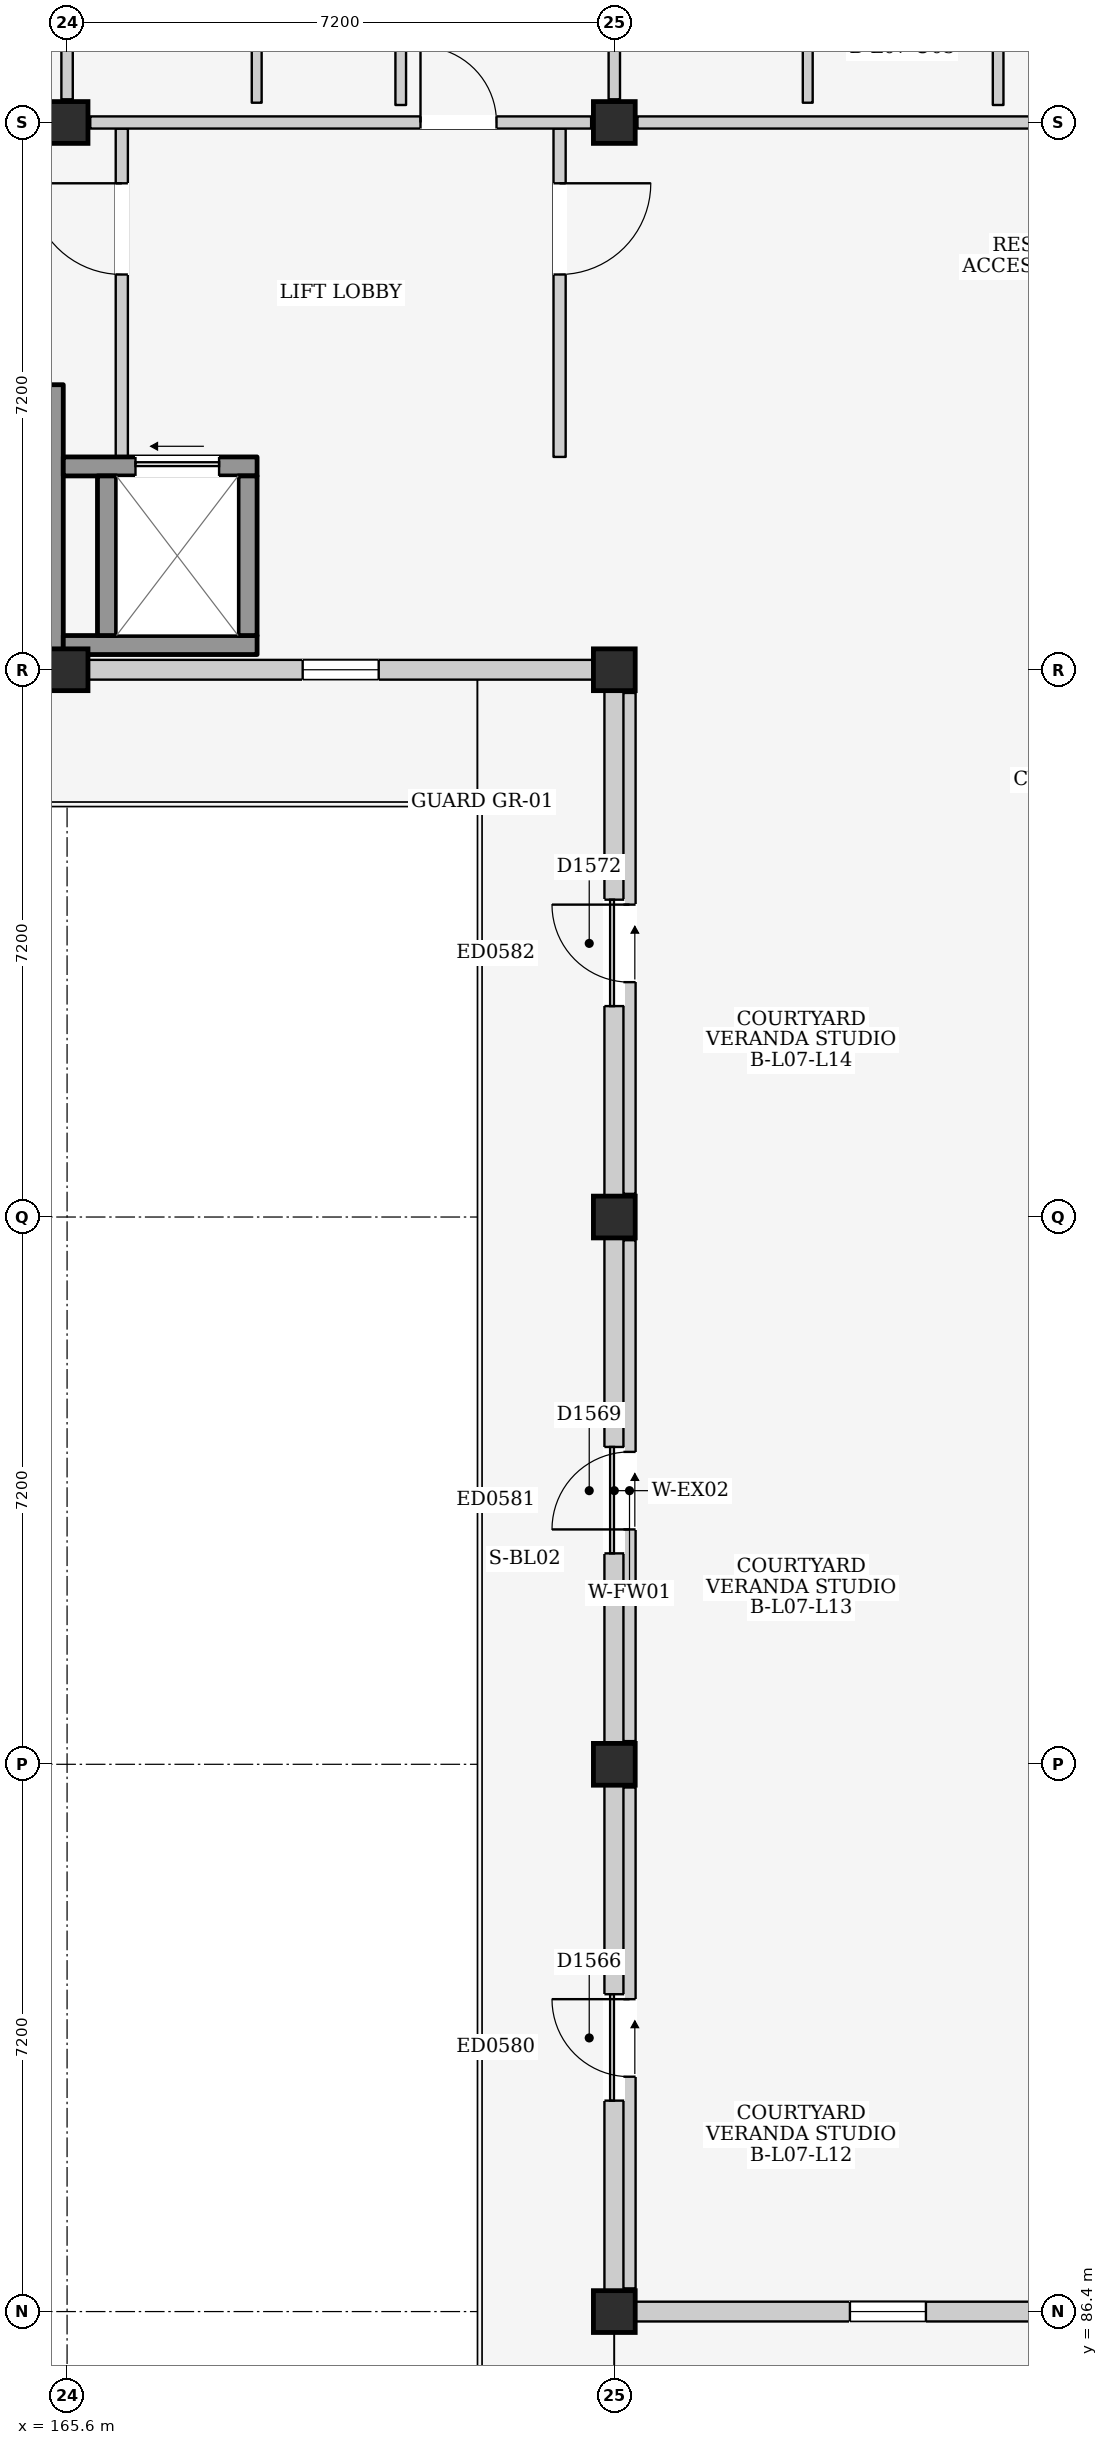
"""IFC4 building model, lengths in metres.
Left out: names, types, materials, properties, quantities, classifications, styles, units other than length and angle.
Written with IfcOpenShell. Run it as: python <this file> out.ifc"""

import sys

from ifc_helpers import new_model, si_unit, direction, frame, frame_2d, origin, origin_2d, place, context, subcontext, project, spatial, rectangle, extrude, element, fill, save


model = new_model("IFC4")
c1 = context("Model", 3, precision=1e-05, world=origin(), true_north=direction((0.0, 1.0)))
c2 = subcontext(c1, "Body", "Model", "MODEL_VIEW")
j1 = project(units=[si_unit("LENGTHUNIT", "METRE"), si_unit("PLANEANGLEUNIT", "RADIAN")], contexts=[c1])
p1 = place(None, origin())
s1 = spatial("IfcSite", under=j1, at=p1, CompositionType="ELEMENT")
p2 = place(p1, origin())
s2 = spatial("IfcBuilding", under=s1, at=p2, CompositionType="ELEMENT")
p3 = place(p2, frame((0.0, 0.0, 25.1)))
s3 = spatial("IfcBuildingStorey", under=s2, at=p3, CompositionType="ELEMENT", Elevation=25.1)
for number, where, z_axis, x_axis in (
    (1, (165.6, 108.0, 0.0), (0.0, 0.0, 1.0), (1.0, 0.0, 0.0)),
    (2, (165.6, 115.2, 0.0), (0.0, 0.0, 1.0), (1.0, 0.0, 0.0)),
    (3, (172.8, 86.4, 0.0), (0.0, 0.0, 1.0), (1.0, 0.0, 0.0)),
    (4, (172.8, 93.6, 0.0), (0.0, 0.0, 1.0), (1.0, 0.0, 0.0)),
    (5, (172.8, 100.8, 0.0), (0.0, 0.0, 1.0), (1.0, 0.0, 0.0)),
    (6, (172.8, 108.0, 0.0), (0.0, 0.0, 1.0), (1.0, 0.0, 0.0)),
    (7, (172.8, 115.2, 0.0), (0.0, 0.0, 1.0), (1.0, 0.0, 0.0)),
):
    element("IfcColumn", number, at=place(p3, frame(where, z_axis=z_axis, x_axis=x_axis)), inside=s3, PredefinedType="COLUMN", context=c2, shape_type="SweptSolid", body=[
        extrude(rectangle(XDim=0.55, YDim=0.55, at=origin_2d()), origin(), (0.0, 0.0, 1.0), 3.2),
    ])
p4 = place(p3, frame((165.875, 108.0, 0.0), z_axis=(0.0, 0.0, 1.0), x_axis=(1.0, 0.0, 0.0)))
e8 = element("IfcWall", 8, at=p4, inside=s3, PredefinedType="ELEMENTEDWALL", context=c2, shape_type="SweptSolid", body=[
    extrude(rectangle(XDim=6.65, YDim=0.26, at=frame_2d((3.325, 0.0))), origin(), (0.0, 0.0, 1.0), 2.375),
])
p5 = place(p4, frame((2.825, 0.0, 1.2)))
e9 = element("IfcOpeningElement", 9, at=p5, cuts=e8, PredefinedType="OPENING", context=c2, shape_type="SweptSolid", body=[
    extrude(rectangle(XDim=1.0, YDim=0.9, at=frame_2d((0.5, 0.45))), frame((0.0, 0.145, 0.0), z_axis=(0.0, -1.0, 0.0), x_axis=(1.0, 0.0, 0.0)), (0.0, 0.0, 1.0), 0.29),
])
p6 = place(p3, frame((173.075, 86.4, 0.0), z_axis=(0.0, 0.0, 1.0), x_axis=(1.0, 0.0, 0.0)))
e10 = element("IfcWall", 10, at=p6, inside=s3, PredefinedType="ELEMENTEDWALL", context=c2, shape_type="SweptSolid", body=[
    extrude(rectangle(XDim=6.65, YDim=0.26, at=frame_2d((3.325, 0.0))), origin(), (0.0, 0.0, 1.0), 2.375),
])
p7 = place(p6, frame((2.825, 0.0, 1.1)))
e11 = element("IfcOpeningElement", 11, at=p7, cuts=e10, PredefinedType="OPENING", context=c2, shape_type="SweptSolid", body=[
    extrude(rectangle(XDim=1.0, YDim=0.9, at=frame_2d((0.5, 0.45))), frame((0.0, 0.145, 0.0), z_axis=(0.0, -1.0, 0.0), x_axis=(1.0, 0.0, 0.0)), (0.0, 0.0, 1.0), 0.29),
])
p8 = place(p3, frame((172.8, 86.675, 0.0), z_axis=(0.0, 0.0, 1.0), x_axis=(0.0, 1.0, 0.0)))
e12 = element("IfcWall", 12, at=p8, inside=s3, PredefinedType="ELEMENTEDWALL", context=c2, shape_type="SweptSolid", body=[
    extrude(rectangle(XDim=6.65, YDim=0.26, at=frame_2d((3.325, 0.0))), origin(), (0.0, 0.0, 1.0), 2.475),
])
p9 = place(p8, frame((2.5, 0.0, 0.0)))
e13 = element("IfcOpeningElement", 13, at=p9, cuts=e12, PredefinedType="OPENING", context=c2, shape_type="SweptSolid", body=[
    extrude(rectangle(XDim=1.4, YDim=2.1, at=frame_2d((0.7, 1.05))), frame((0.0, 0.145, 0.0), z_axis=(0.0, -1.0, 0.0), x_axis=(1.0, 0.0, 0.0)), (0.0, 0.0, 1.0), 0.29),
])
p10 = place(p3, frame((172.8, 93.875, 0.0), z_axis=(0.0, 0.0, 1.0), x_axis=(0.0, 1.0, 0.0)))
e14 = element("IfcWall", 14, at=p10, inside=s3, PredefinedType="ELEMENTEDWALL", context=c2, shape_type="SweptSolid", body=[
    extrude(rectangle(XDim=6.65, YDim=0.26, at=frame_2d((3.325, 0.0))), origin(), (0.0, 0.0, 1.0), 2.475),
])
p11 = place(p10, frame((2.5, 0.0, 0.0)))
e15 = element("IfcOpeningElement", 15, at=p11, cuts=e14, PredefinedType="OPENING", context=c2, shape_type="SweptSolid", body=[
    extrude(rectangle(XDim=1.4, YDim=2.1, at=frame_2d((0.7, 1.05))), frame((0.0, 0.145, 0.0), z_axis=(0.0, -1.0, 0.0), x_axis=(1.0, 0.0, 0.0)), (0.0, 0.0, 1.0), 0.29),
])
p12 = place(p3, frame((172.8, 101.075, 0.0), z_axis=(0.0, 0.0, 1.0), x_axis=(0.0, 1.0, 0.0)))
e16 = element("IfcWall", 16, at=p12, inside=s3, PredefinedType="ELEMENTEDWALL", context=c2, shape_type="SweptSolid", body=[
    extrude(rectangle(XDim=6.65, YDim=0.26, at=frame_2d((3.325, 0.0))), origin(), (0.0, 0.0, 1.0), 2.475),
])
p13 = place(p12, frame((2.5, 0.0, 0.0)))
e17 = element("IfcOpeningElement", 17, at=p13, cuts=e16, PredefinedType="OPENING", context=c2, shape_type="SweptSolid", body=[
    extrude(rectangle(XDim=1.4, YDim=2.1, at=frame_2d((0.7, 1.05))), frame((0.0, 0.145, 0.0), z_axis=(0.0, -1.0, 0.0), x_axis=(1.0, 0.0, 0.0)), (0.0, 0.0, 1.0), 0.29),
])
p14 = place(p3, frame((165.4, 108.15, 0.0), z_axis=(0.0, 0.0, 1.0), x_axis=(0.0, 1.0, 0.0)))
e18 = element("IfcWall", 18, at=p14, inside=s3, PredefinedType="SHEAR", context=c2, shape_type="SweptSolid", body=[
    extrude(rectangle(XDim=3.6, YDim=0.3, at=frame_2d((1.8, 0.0))), origin(), (0.0, 0.0, 1.0), 2.99),
])
p15 = place(p3, frame((166.32, 110.8, 0.0), z_axis=(0.0, 0.0, 1.0), x_axis=(0.0, 1.0, 0.0)))
e19 = element("IfcWall", 19, at=p15, inside=s3, PredefinedType="PARTITIONING", context=c2, shape_type="SweptSolid", body=[
    extrude(rectangle(XDim=4.32, YDim=0.16, at=frame_2d((2.16, 0.0))), origin(), (0.0, 0.0, 1.0), 2.99),
])
p16 = place(p15, frame((2.4, 0.0, 0.0)))
e20 = element("IfcOpeningElement", 20, at=p16, cuts=e19, PredefinedType="OPENING", context=c2, shape_type="SweptSolid", body=[
    extrude(rectangle(XDim=1.2, YDim=2.2, at=frame_2d((0.6, 1.1))), frame((0.0, 0.095, 0.0), z_axis=(0.0, -1.0, 0.0), x_axis=(1.0, 0.0, 0.0)), (0.0, 0.0, 1.0), 0.19),
])
p17 = place(p3, frame((172.08, 110.8, 0.0), z_axis=(0.0, 0.0, 1.0), x_axis=(0.0, 1.0, 0.0)))
e21 = element("IfcWall", 21, at=p17, inside=s3, PredefinedType="PARTITIONING", context=c2, shape_type="SweptSolid", body=[
    extrude(rectangle(XDim=4.32, YDim=0.16, at=frame_2d((2.16, 0.0))), origin(), (0.0, 0.0, 1.0), 2.99),
])
p18 = place(p17, frame((2.4, 0.0, 0.0)))
e22 = element("IfcOpeningElement", 22, at=p18, cuts=e21, PredefinedType="OPENING", context=c2, shape_type="SweptSolid", body=[
    extrude(rectangle(XDim=1.2, YDim=2.2, at=frame_2d((0.6, 1.1))), frame((0.0, 0.095, 0.0), z_axis=(0.0, -1.0, 0.0), x_axis=(1.0, 0.0, 0.0)), (0.0, 0.0, 1.0), 0.19),
])
p19 = place(p3, frame((165.55, 108.325, 0.0), z_axis=(0.0, 0.0, 1.0), x_axis=(1.0, 0.0, 0.0)))
e23 = element("IfcWall", 23, at=p19, inside=s3, PredefinedType="SHEAR", context=c2, shape_type="SweptSolid", body=[
    extrude(rectangle(XDim=2.55, YDim=0.25, at=frame_2d((1.275, 0.0))), origin(), (0.0, 0.0, 1.0), 2.99),
])
p20 = place(p3, frame((165.55, 110.675, 0.0), z_axis=(0.0, 0.0, 1.0), x_axis=(1.0, 0.0, 0.0)))
e24 = element("IfcWall", 24, at=p20, inside=s3, PredefinedType="SHEAR", context=c2, shape_type="SweptSolid", body=[
    extrude(rectangle(XDim=2.55, YDim=0.25, at=frame_2d((1.275, 0.0))), origin(), (0.0, 0.0, 1.0), 2.99),
])
p21 = place(p20, frame((0.95, 0.0, 0.0)))
e25 = element("IfcOpeningElement", 25, at=p21, cuts=e24, PredefinedType="OPENING", context=c2, shape_type="SweptSolid", body=[
    extrude(rectangle(XDim=1.1, YDim=2.15, at=frame_2d((0.55, 1.075))), frame((0.0, 0.14, 0.0), z_axis=(0.0, -1.0, 0.0), x_axis=(1.0, 0.0, 0.0)), (0.0, 0.0, 1.0), 0.28),
])
for number, where, z_axis, x_axis in (
    (26, (166.125, 108.45, 0.0), (0.0, 0.0, 1.0), (0.0, 1.0, 0.0)),
    (27, (167.975, 108.45, 0.0), (0.0, 0.0, 1.0), (0.0, 1.0, 0.0)),
):
    element("IfcWall", number, at=place(p3, frame(where, z_axis=z_axis, x_axis=x_axis)), inside=s3, PredefinedType="SHEAR", context=c2, shape_type="SweptSolid", body=[
        extrude(rectangle(XDim=2.1, YDim=0.25, at=frame_2d((1.05, 0.0))), origin(), (0.0, 0.0, 1.0), 2.99),
    ])
p22 = place(p3, frame((165.6, 115.505, 0.0), z_axis=(0.0, 0.0, 1.0), x_axis=(0.0, 1.0, 0.0)))
e28 = element("IfcWall", 28, at=p22, inside=s3, PredefinedType="PARTITIONING", context=c2, shape_type="SweptSolid", body=[
    extrude(rectangle(XDim=6.59, YDim=0.15, at=frame_2d((3.295, 0.0))), origin(), (0.0, 0.0, 1.0), 2.475),
])
p23 = place(p3, frame((165.905, 115.2, 0.0), z_axis=(0.0, 0.0, 1.0), x_axis=(1.0, 0.0, 0.0)))
e29 = element("IfcWall", 29, at=p23, inside=s3, PredefinedType="PARTITIONING", context=c2, shape_type="SweptSolid", body=[
    extrude(rectangle(XDim=6.59, YDim=0.16, at=frame_2d((3.295, 0.0))), origin(), (0.0, 0.0, 1.0), 2.375),
])
p24 = place(p23, frame((4.345, 0.0, 0.0)))
e30 = element("IfcOpeningElement", 30, at=p24, cuts=e29, PredefinedType="OPENING", context=c2, shape_type="SweptSolid", body=[
    extrude(rectangle(XDim=1.0, YDim=2.15, at=frame_2d((0.5, 1.075))), frame((0.0, 0.095, 0.0), z_axis=(0.0, -1.0, 0.0), x_axis=(1.0, 0.0, 0.0)), (0.0, 0.0, 1.0), 0.19),
])
p25 = place(p3, frame((172.8, 115.505, 0.0), z_axis=(0.0, 0.0, 1.0), x_axis=(0.0, 1.0, 0.0)))
e31 = element("IfcWall", 31, at=p25, inside=s3, PredefinedType="PARTITIONING", context=c2, shape_type="SweptSolid", body=[
    extrude(rectangle(XDim=6.59, YDim=0.15, at=frame_2d((3.295, 0.0))), origin(), (0.0, 0.0, 1.0), 2.475),
])
p26 = place(p3, frame((168.095, 115.46, 0.0), z_axis=(0.0, 0.0, 1.0), x_axis=(0.0, 1.0, 0.0)))
e32 = element("IfcWall", 32, at=p26, inside=s3, PredefinedType="PARTITIONING", context=c2, shape_type="SweptSolid", body=[
    extrude(rectangle(XDim=2.33, YDim=0.13, at=frame_2d((1.165, 0.0))), origin(), (0.0, 0.0, 1.0), 2.99),
])
p27 = place(p3, frame((169.99, 115.43, 0.0), z_axis=(0.0, 0.0, 1.0), x_axis=(0.0, 1.0, 0.0)))
e33 = element("IfcWall", 33, at=p27, inside=s3, PredefinedType="PARTITIONING", context=c2, shape_type="SweptSolid", body=[
    extrude(rectangle(XDim=2.35, YDim=0.14, at=frame_2d((1.175, 0.0))), origin(), (0.0, 0.0, 1.0), 2.99),
])
p28 = place(p3, frame((173.105, 115.2, 0.0), z_axis=(0.0, 0.0, 1.0), x_axis=(1.0, 0.0, 0.0)))
e34 = element("IfcWall", 34, at=p28, inside=s3, PredefinedType="PARTITIONING", context=c2, shape_type="SweptSolid", body=[
    extrude(rectangle(XDim=6.59, YDim=0.16, at=frame_2d((3.295, 0.0))), origin(), (0.0, 0.0, 1.0), 2.375),
])
p29 = place(p28, frame((5.325, 0.0, 0.0)))
e35 = element("IfcOpeningElement", 35, at=p29, cuts=e34, PredefinedType="OPENING", context=c2, shape_type="SweptSolid", body=[
    extrude(rectangle(XDim=1.0, YDim=2.15, at=frame_2d((0.5, 1.075))), frame((0.0, 0.095, 0.0), z_axis=(0.0, -1.0, 0.0), x_axis=(1.0, 0.0, 0.0)), (0.0, 0.0, 1.0), 0.19),
])
p30 = place(p3, frame((175.345, 115.46, 0.0), z_axis=(0.0, 0.0, 1.0), x_axis=(0.0, 1.0, 0.0)))
e36 = element("IfcWall", 36, at=p30, inside=s3, PredefinedType="PARTITIONING", context=c2, shape_type="SweptSolid", body=[
    extrude(rectangle(XDim=3.04, YDim=0.13, at=frame_2d((1.52, 0.0))), origin(), (0.0, 0.0, 1.0), 2.99),
])
p31 = place(p3, frame((177.85, 115.43, 0.0), z_axis=(0.0, 0.0, 1.0), x_axis=(0.0, 1.0, 0.0)))
e37 = element("IfcWall", 37, at=p31, inside=s3, PredefinedType="PARTITIONING", context=c2, shape_type="SweptSolid", body=[
    extrude(rectangle(XDim=3.06, YDim=0.14, at=frame_2d((1.53, 0.0))), origin(), (0.0, 0.0, 1.0), 2.99),
])
p32 = place(p3, frame((173.0, 86.705, 0.0), z_axis=(0.0, 0.0, 1.0), x_axis=(0.0, 1.0, 0.0)))
e38 = element("IfcWall", 38, at=p32, inside=s3, PredefinedType="PARTITIONING", context=c2, shape_type="SweptSolid", body=[
    extrude(rectangle(XDim=6.59, YDim=0.16, at=frame_2d((3.295, 0.0))), origin(), (0.0, 0.0, 1.0), 2.99),
])
p33 = place(p32, frame((2.785, 0.0, 0.0)))
e39 = element("IfcOpeningElement", 39, at=p33, cuts=e38, PredefinedType="OPENING", context=c2, shape_type="SweptSolid", body=[
    extrude(rectangle(XDim=1.02, YDim=2.18, at=frame_2d((0.51, 1.09))), frame((0.0, 0.095, 0.0), z_axis=(0.0, -1.0, 0.0), x_axis=(1.0, 0.0, 0.0)), (0.0, 0.0, 1.0), 0.19),
])
p34 = place(p3, frame((173.0, 93.905, 0.0), z_axis=(0.0, 0.0, 1.0), x_axis=(0.0, 1.0, 0.0)))
e40 = element("IfcWall", 40, at=p34, inside=s3, PredefinedType="PARTITIONING", context=c2, shape_type="SweptSolid", body=[
    extrude(rectangle(XDim=6.59, YDim=0.16, at=frame_2d((3.295, 0.0))), origin(), (0.0, 0.0, 1.0), 2.99),
])
p35 = place(p34, frame((2.785, 0.0, 0.0)))
e41 = element("IfcOpeningElement", 41, at=p35, cuts=e40, PredefinedType="OPENING", context=c2, shape_type="SweptSolid", body=[
    extrude(rectangle(XDim=1.02, YDim=2.18, at=frame_2d((0.51, 1.09))), frame((0.0, 0.095, 0.0), z_axis=(0.0, -1.0, 0.0), x_axis=(1.0, 0.0, 0.0)), (0.0, 0.0, 1.0), 0.19),
])
p36 = place(p3, frame((173.0, 101.105, 0.0), z_axis=(0.0, 0.0, 1.0), x_axis=(0.0, 1.0, 0.0)))
e42 = element("IfcWall", 42, at=p36, inside=s3, PredefinedType="PARTITIONING", context=c2, shape_type="SweptSolid", body=[
    extrude(rectangle(XDim=6.59, YDim=0.16, at=frame_2d((3.295, 0.0))), origin(), (0.0, 0.0, 1.0), 2.99),
])
p37 = place(p36, frame((2.785, 0.0, 0.0)))
e43 = element("IfcOpeningElement", 43, at=p37, cuts=e42, PredefinedType="OPENING", context=c2, shape_type="SweptSolid", body=[
    extrude(rectangle(XDim=1.02, YDim=2.18, at=frame_2d((0.51, 1.09))), frame((0.0, 0.095, 0.0), z_axis=(0.0, -1.0, 0.0), x_axis=(1.0, 0.0, 0.0)), (0.0, 0.0, 1.0), 0.19),
])
p38 = place(p5, origin())
e44 = element("IfcWindow", 44, at=p38, inside=s3, PartitioningType="SINGLE_PANEL", PredefinedType="WINDOW", context=c2, shape_type="SweptSolid", body=[
    extrude(rectangle(XDim=1.0, YDim=0.9, at=frame_2d((0.5, 0.45))), frame((0.0, 0.03, 0.0), z_axis=(0.0, -1.0, 0.0), x_axis=(1.0, 0.0, 0.0)), (0.0, 0.0, 1.0), 0.06),
])
fill(e9, e44)
p39 = place(p7, origin())
e45 = element("IfcWindow", 45, at=p39, inside=s3, PartitioningType="SINGLE_PANEL", PredefinedType="WINDOW", context=c2, shape_type="SweptSolid", body=[
    extrude(rectangle(XDim=1.0, YDim=0.9, at=frame_2d((0.5, 0.45))), frame((0.0, 0.03, 0.0), z_axis=(0.0, -1.0, 0.0), x_axis=(1.0, 0.0, 0.0)), (0.0, 0.0, 1.0), 0.06),
])
fill(e11, e45)
p40 = place(p9, frame((1.4, 0.0, 0.0), z_axis=(0.0, 0.0, 1.0), x_axis=(-1.0, 0.0, 0.0)))
e46 = element("IfcDoor", 46, at=p40, inside=s3, OperationType="SLIDING_TO_RIGHT", PredefinedType="DOOR", context=c2, shape_type="SweptSolid", body=[
    extrude(rectangle(XDim=1.4, YDim=2.1, at=frame_2d((0.7, 1.05))), frame((0.0, 0.025, 0.0), z_axis=(0.0, -1.0, 0.0), x_axis=(1.0, 0.0, 0.0)), (0.0, 0.0, 1.0), 0.05),
])
fill(e13, e46)
p41 = place(p11, frame((1.4, 0.0, 0.0), z_axis=(0.0, 0.0, 1.0), x_axis=(-1.0, 0.0, 0.0)))
e47 = element("IfcDoor", 47, at=p41, inside=s3, OperationType="SLIDING_TO_RIGHT", PredefinedType="DOOR", context=c2, shape_type="SweptSolid", body=[
    extrude(rectangle(XDim=1.4, YDim=2.1, at=frame_2d((0.7, 1.05))), frame((0.0, 0.025, 0.0), z_axis=(0.0, -1.0, 0.0), x_axis=(1.0, 0.0, 0.0)), (0.0, 0.0, 1.0), 0.05),
])
fill(e15, e47)
p42 = place(p13, frame((1.4, 0.0, 0.0), z_axis=(0.0, 0.0, 1.0), x_axis=(-1.0, 0.0, 0.0)))
e48 = element("IfcDoor", 48, at=p42, inside=s3, OperationType="SLIDING_TO_RIGHT", PredefinedType="DOOR", context=c2, shape_type="SweptSolid", body=[
    extrude(rectangle(XDim=1.4, YDim=2.1, at=frame_2d((0.7, 1.05))), frame((0.0, 0.025, 0.0), z_axis=(0.0, -1.0, 0.0), x_axis=(1.0, 0.0, 0.0)), (0.0, 0.0, 1.0), 0.05),
])
fill(e17, e48)
p43 = place(p16, origin())
e49 = element("IfcDoor", 49, at=p43, inside=s3, OperationType="SINGLE_SWING_RIGHT", PredefinedType="DOOR", context=c2, shape_type="SweptSolid", body=[
    extrude(rectangle(XDim=1.2, YDim=2.2, at=frame_2d((0.6, 1.1))), frame((0.0, 0.025, 0.0), z_axis=(0.0, -1.0, 0.0), x_axis=(1.0, 0.0, 0.0)), (0.0, 0.0, 1.0), 0.05),
])
fill(e20, e49)
p44 = place(p18, frame((1.2, 0.0, 0.0), z_axis=(0.0, 0.0, 1.0), x_axis=(-1.0, 0.0, 0.0)))
e50 = element("IfcDoor", 50, at=p44, inside=s3, OperationType="SINGLE_SWING_LEFT", PredefinedType="DOOR", context=c2, shape_type="SweptSolid", body=[
    extrude(rectangle(XDim=1.2, YDim=2.2, at=frame_2d((0.6, 1.1))), frame((0.0, 0.025, 0.0), z_axis=(0.0, -1.0, 0.0), x_axis=(1.0, 0.0, 0.0)), (0.0, 0.0, 1.0), 0.05),
])
fill(e22, e50)
p45 = place(p21, origin())
e51 = element("IfcDoor", 51, at=p45, inside=s3, OperationType="SLIDING_TO_LEFT", PredefinedType="DOOR", context=c2, shape_type="SweptSolid", body=[
    extrude(rectangle(XDim=1.1, YDim=2.15, at=frame_2d((0.55, 1.075))), frame((0.0, 0.025, 0.0), z_axis=(0.0, -1.0, 0.0), x_axis=(1.0, 0.0, 0.0)), (0.0, 0.0, 1.0), 0.05),
])
fill(e25, e51)
p46 = place(p24, origin())
e52 = element("IfcDoor", 52, at=p46, inside=s3, OperationType="SINGLE_SWING_LEFT", PredefinedType="DOOR", context=c2, shape_type="SweptSolid", body=[
    extrude(rectangle(XDim=1.0, YDim=2.15, at=frame_2d((0.5, 1.075))), frame((0.0, 0.025, 0.0), z_axis=(0.0, -1.0, 0.0), x_axis=(1.0, 0.0, 0.0)), (0.0, 0.0, 1.0), 0.05),
])
fill(e30, e52)
p47 = place(p33, origin())
e53 = element("IfcDoor", 53, at=p47, inside=s3, OperationType="SINGLE_SWING_RIGHT", PredefinedType="DOOR", context=c2, shape_type="SweptSolid", body=[
    extrude(rectangle(XDim=1.02, YDim=2.18, at=frame_2d((0.51, 1.09))), frame((0.0, 0.025, 0.0), z_axis=(0.0, -1.0, 0.0), x_axis=(1.0, 0.0, 0.0)), (0.0, 0.0, 1.0), 0.05),
])
fill(e39, e53)
p48 = place(p35, origin())
e54 = element("IfcDoor", 54, at=p48, inside=s3, OperationType="SINGLE_SWING_LEFT", PredefinedType="DOOR", context=c2, shape_type="SweptSolid", body=[
    extrude(rectangle(XDim=1.02, YDim=2.18, at=frame_2d((0.51, 1.09))), frame((0.0, 0.025, 0.0), z_axis=(0.0, -1.0, 0.0), x_axis=(1.0, 0.0, 0.0)), (0.0, 0.0, 1.0), 0.05),
])
fill(e41, e54)
p49 = place(p37, origin())
e55 = element("IfcDoor", 55, at=p49, inside=s3, OperationType="SINGLE_SWING_RIGHT", PredefinedType="DOOR", context=c2, shape_type="SweptSolid", body=[
    extrude(rectangle(XDim=1.02, YDim=2.18, at=frame_2d((0.51, 1.09))), frame((0.0, 0.025, 0.0), z_axis=(0.0, -1.0, 0.0), x_axis=(1.0, 0.0, 0.0)), (0.0, 0.0, 1.0), 0.05),
])
fill(e43, e55)
save(model, sys.argv[1])
